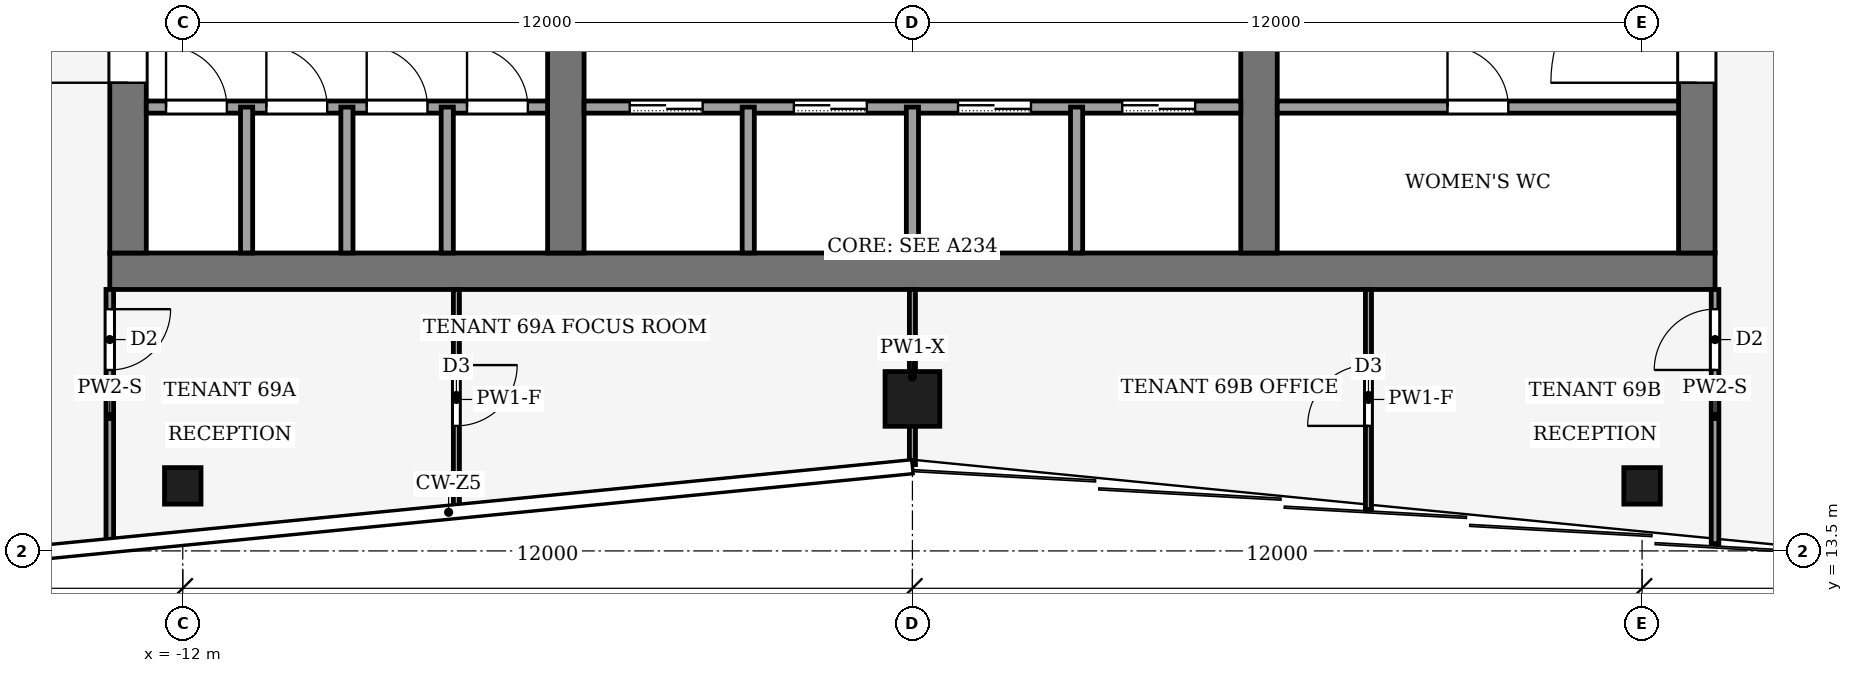
"""IFC4 building model, lengths in metres.
Left out: names, types, materials, properties, quantities, classifications, styles, units other than length and angle.
Written with IfcOpenShell. Run it as: python <this file> out.ifc"""

import sys

from ifc_helpers import new_model, si_unit, direction, frame, frame_2d, origin, origin_2d, place, context, subcontext, project, spatial, rectangle, hollow_rectangle, extrude, element, fill, save


model = new_model("IFC4")
c1 = context("Model", 3, precision=1e-05, world=origin(), true_north=direction((0.0, 1.0)))
c2 = subcontext(c1, "Body", "Model", "MODEL_VIEW")
j1 = project(units=[si_unit("LENGTHUNIT", "METRE"), si_unit("PLANEANGLEUNIT", "RADIAN")], contexts=[c1])
p1 = place(None, origin())
s1 = spatial("IfcSite", under=j1, at=p1, CompositionType="ELEMENT")
p2 = place(p1, origin())
s2 = spatial("IfcBuilding", under=s1, at=p2, CompositionType="ELEMENT")
p3 = place(p2, frame((0.0, 0.0, 302.0)))
s3 = spatial("IfcBuildingStorey", under=s2, at=p3, CompositionType="ELEMENT", Elevation=302.0)
p4 = place(p3, frame((-13.2, 18.1, -0.13), z_axis=(0.0, 0.0, 1.0), x_axis=(1.0, 0.0, 0.0)))
e1 = element("IfcWall", 1, at=p4, inside=s3, PredefinedType="SHEAR", context=c2, shape_type="SweptSolid", body=[
    extrude(rectangle(XDim=26.4, YDim=0.6, at=frame_2d((13.2, 0.0))), origin(), (0.0, 0.0, 1.0), 4.0),
])
p5 = place(p3, frame((-12.9, 18.4, -0.13), z_axis=(0.0, 0.0, 1.0), x_axis=(0.0, 1.0, 0.0)))
e2 = element("IfcWall", 2, at=p5, inside=s3, PredefinedType="SHEAR", context=c2, shape_type="SweptSolid", body=[
    extrude(rectangle(XDim=19.2, YDim=0.6, at=frame_2d((9.6, 0.0))), origin(), (0.0, 0.0, 1.0), 4.0),
])
p6 = place(p5, frame((2.8, 0.0, 0.13)))
e3 = element("IfcOpeningElement", 3, at=p6, cuts=e2, PredefinedType="OPENING", context=c2, shape_type="SweptSolid", body=[
    extrude(rectangle(XDim=2.4, YDim=2.4, at=frame_2d((1.2, 1.2))), frame((0.0, 0.31, 0.0), z_axis=(0.0, -1.0, 0.0), x_axis=(1.0, 0.0, 0.0)), (0.0, 0.0, 1.0), 0.62),
])
p7 = place(p5, frame((13.4, 0.0, 0.13)))
e4 = element("IfcOpeningElement", 4, at=p7, cuts=e2, PredefinedType="OPENING", context=c2, shape_type="SweptSolid", body=[
    extrude(rectangle(XDim=1.4, YDim=2.2, at=frame_2d((0.7, 1.1))), frame((0.0, 0.31, 0.0), z_axis=(0.0, -1.0, 0.0), x_axis=(1.0, 0.0, 0.0)), (0.0, 0.0, 1.0), 0.62),
])
p8 = place(p3, frame((12.9, 18.4, -0.13), z_axis=(0.0, 0.0, 1.0), x_axis=(0.0, 1.0, 0.0)))
e5 = element("IfcWall", 5, at=p8, inside=s3, PredefinedType="SHEAR", context=c2, shape_type="SweptSolid", body=[
    extrude(rectangle(XDim=19.2, YDim=0.6, at=frame_2d((9.6, 0.0))), origin(), (0.0, 0.0, 1.0), 4.0),
])
p9 = place(p8, frame((2.8, 0.0, 0.13)))
e6 = element("IfcOpeningElement", 6, at=p9, cuts=e5, PredefinedType="OPENING", context=c2, shape_type="SweptSolid", body=[
    extrude(rectangle(XDim=2.4, YDim=2.4, at=frame_2d((1.2, 1.2))), frame((0.0, 0.31, 0.0), z_axis=(0.0, -1.0, 0.0), x_axis=(1.0, 0.0, 0.0)), (0.0, 0.0, 1.0), 0.62),
])
p10 = place(p8, frame((13.3, 0.0, 0.13)))
e7 = element("IfcOpeningElement", 7, at=p10, cuts=e5, PredefinedType="OPENING", context=c2, shape_type="SweptSolid", body=[
    extrude(rectangle(XDim=2.4, YDim=2.4, at=frame_2d((1.2, 1.2))), frame((0.0, 0.31, 0.0), z_axis=(0.0, -1.0, 0.0), x_axis=(1.0, 0.0, 0.0)), (0.0, 0.0, 1.0), 0.62),
])
p11 = place(p3, frame((-5.7, 18.4, -0.13), z_axis=(0.0, 0.0, 1.0), x_axis=(0.0, 1.0, 0.0)))
e8 = element("IfcWall", 8, at=p11, inside=s3, PredefinedType="SHEAR", context=c2, shape_type="SweptSolid", body=[
    extrude(rectangle(XDim=19.2, YDim=0.6, at=frame_2d((9.6, 0.0))), origin(), (0.0, 0.0, 1.0), 4.0),
])
p12 = place(p11, frame((8.35, 0.0, 0.13)))
e9 = element("IfcOpeningElement", 9, at=p12, cuts=e8, PredefinedType="OPENING", context=c2, shape_type="SweptSolid", body=[
    extrude(rectangle(XDim=0.9, YDim=2.1, at=frame_2d((0.45, 1.05))), frame((0.0, 0.31, 0.0), z_axis=(0.0, -1.0, 0.0), x_axis=(1.0, 0.0, 0.0)), (0.0, 0.0, 1.0), 0.62),
])
p13 = place(p3, frame((5.7, 18.4, -0.13), z_axis=(0.0, 0.0, 1.0), x_axis=(0.0, 1.0, 0.0)))
e10 = element("IfcWall", 10, at=p13, inside=s3, PredefinedType="SHEAR", context=c2, shape_type="SweptSolid", body=[
    extrude(rectangle(XDim=19.2, YDim=0.6, at=frame_2d((9.6, 0.0))), origin(), (0.0, 0.0, 1.0), 4.0),
])
p14 = place(p13, frame((8.35, 0.0, 0.13)))
e11 = element("IfcOpeningElement", 11, at=p14, cuts=e10, PredefinedType="OPENING", context=c2, shape_type="SweptSolid", body=[
    extrude(rectangle(XDim=0.9, YDim=2.1, at=frame_2d((0.45, 1.05))), frame((0.0, 0.31, 0.0), z_axis=(0.0, -1.0, 0.0), x_axis=(1.0, 0.0, 0.0)), (0.0, 0.0, 1.0), 0.62),
])
p15 = place(p13, frame((13.3, 0.0, 0.13)))
e12 = element("IfcOpeningElement", 12, at=p15, cuts=e10, PredefinedType="OPENING", context=c2, shape_type="SweptSolid", body=[
    extrude(rectangle(XDim=2.4, YDim=2.4, at=frame_2d((1.2, 1.2))), frame((0.0, 0.31, 0.0), z_axis=(0.0, -1.0, 0.0), x_axis=(1.0, 0.0, 0.0)), (0.0, 0.0, 1.0), 0.62),
])
p16 = place(p3, frame((0.0, 16.0, 0.0), z_axis=(0.0, 0.0, 1.0), x_axis=(1.0, 0.0, 0.0)))
e13 = element("IfcColumn", 13, at=p16, inside=s3, PredefinedType="COLUMN", context=c2, shape_type="SweptSolid", body=[
    extrude(hollow_rectangle(XDim=0.9, YDim=0.9, WallThickness=0.04, at=origin_2d()), origin(), (0.0, 0.0, 1.0), 4.0),
])
for number, where, z_axis, x_axis in (
    (14, (-12.0, 14.57, 0.0), (0.0, 0.0, 1.0), (1.0, 0.0, 0.0)),
    (15, (12.0, 14.57, 0.0), (0.0, 0.0, 1.0), (1.0, 0.0, 0.0)),
):
    element("IfcColumn", number, at=place(p3, frame(where, z_axis=z_axis, x_axis=x_axis)), inside=s3, PredefinedType="COLUMN", context=c2, shape_type="SweptSolid", body=[
        extrude(hollow_rectangle(XDim=0.6, YDim=0.6, WallThickness=0.025, at=origin_2d()), origin(), (0.0, 0.0, 1.0), 4.0),
    ])
p17 = place(p3, frame((-12.6, 20.8, 0.0), z_axis=(0.0, 0.0, 1.0), x_axis=(1.0, 0.0, 0.0)))
e16 = element("IfcWall", 16, at=p17, inside=s3, PredefinedType="PARTITIONING", context=c2, shape_type="SweptSolid", body=[
    extrude(rectangle(XDim=6.6, YDim=0.2, at=frame_2d((3.3, 0.0))), origin(), (0.0, 0.0, 1.0), 3.87),
])
p18 = place(p17, frame((0.325, 0.0, 0.0)))
e17 = element("IfcOpeningElement", 17, at=p18, cuts=e16, PredefinedType="OPENING", context=c2, shape_type="SweptSolid", body=[
    extrude(rectangle(XDim=1.0, YDim=2.1, at=frame_2d((0.5, 1.05))), frame((0.0, 0.11, 0.0), z_axis=(0.0, -1.0, 0.0), x_axis=(1.0, 0.0, 0.0)), (0.0, 0.0, 1.0), 0.22),
])
p19 = place(p17, frame((1.975, 0.0, 0.0)))
e18 = element("IfcOpeningElement", 18, at=p19, cuts=e16, PredefinedType="OPENING", context=c2, shape_type="SweptSolid", body=[
    extrude(rectangle(XDim=1.0, YDim=2.1, at=frame_2d((0.5, 1.05))), frame((0.0, 0.11, 0.0), z_axis=(0.0, -1.0, 0.0), x_axis=(1.0, 0.0, 0.0)), (0.0, 0.0, 1.0), 0.22),
])
p20 = place(p17, frame((3.625, 0.0, 0.0)))
e19 = element("IfcOpeningElement", 19, at=p20, cuts=e16, PredefinedType="OPENING", context=c2, shape_type="SweptSolid", body=[
    extrude(rectangle(XDim=1.0, YDim=2.1, at=frame_2d((0.5, 1.05))), frame((0.0, 0.11, 0.0), z_axis=(0.0, -1.0, 0.0), x_axis=(1.0, 0.0, 0.0)), (0.0, 0.0, 1.0), 0.22),
])
p21 = place(p17, frame((5.275, 0.0, 0.0)))
e20 = element("IfcOpeningElement", 20, at=p21, cuts=e16, PredefinedType="OPENING", context=c2, shape_type="SweptSolid", body=[
    extrude(rectangle(XDim=1.0, YDim=2.1, at=frame_2d((0.5, 1.05))), frame((0.0, 0.11, 0.0), z_axis=(0.0, -1.0, 0.0), x_axis=(1.0, 0.0, 0.0)), (0.0, 0.0, 1.0), 0.22),
])
p22 = place(p3, frame((-5.4, 20.8, 0.0), z_axis=(0.0, 0.0, 1.0), x_axis=(1.0, 0.0, 0.0)))
e21 = element("IfcWall", 21, at=p22, inside=s3, PredefinedType="PARTITIONING", context=c2, shape_type="SweptSolid", body=[
    extrude(rectangle(XDim=10.8, YDim=0.2, at=frame_2d((5.4, 0.0))), origin(), (0.0, 0.0, 1.0), 3.87),
])
p23 = place(p22, frame((0.75, 0.0, 0.0)))
e22 = element("IfcOpeningElement", 22, at=p23, cuts=e21, PredefinedType="OPENING", context=c2, shape_type="SweptSolid", body=[
    extrude(rectangle(XDim=1.2, YDim=2.2, at=frame_2d((0.6, 1.1))), frame((0.0, 0.11, 0.0), z_axis=(0.0, -1.0, 0.0), x_axis=(1.0, 0.0, 0.0)), (0.0, 0.0, 1.0), 0.22),
])
p24 = place(p22, frame((3.45, 0.0, 0.0)))
e23 = element("IfcOpeningElement", 23, at=p24, cuts=e21, PredefinedType="OPENING", context=c2, shape_type="SweptSolid", body=[
    extrude(rectangle(XDim=1.2, YDim=2.2, at=frame_2d((0.6, 1.1))), frame((0.0, 0.11, 0.0), z_axis=(0.0, -1.0, 0.0), x_axis=(1.0, 0.0, 0.0)), (0.0, 0.0, 1.0), 0.22),
])
p25 = place(p22, frame((6.15, 0.0, 0.0)))
e24 = element("IfcOpeningElement", 24, at=p25, cuts=e21, PredefinedType="OPENING", context=c2, shape_type="SweptSolid", body=[
    extrude(rectangle(XDim=1.2, YDim=2.2, at=frame_2d((0.6, 1.1))), frame((0.0, 0.11, 0.0), z_axis=(0.0, -1.0, 0.0), x_axis=(1.0, 0.0, 0.0)), (0.0, 0.0, 1.0), 0.22),
])
p26 = place(p22, frame((8.85, 0.0, 0.0)))
e25 = element("IfcOpeningElement", 25, at=p26, cuts=e21, PredefinedType="OPENING", context=c2, shape_type="SweptSolid", body=[
    extrude(rectangle(XDim=1.2, YDim=2.2, at=frame_2d((0.6, 1.1))), frame((0.0, 0.11, 0.0), z_axis=(0.0, -1.0, 0.0), x_axis=(1.0, 0.0, 0.0)), (0.0, 0.0, 1.0), 0.22),
])
p27 = place(p3, frame((6.0, 20.8, 0.0), z_axis=(0.0, 0.0, 1.0), x_axis=(1.0, 0.0, 0.0)))
e26 = element("IfcWall", 26, at=p27, inside=s3, PredefinedType="PARTITIONING", context=c2, shape_type="SweptSolid", body=[
    extrude(rectangle(XDim=6.6, YDim=0.2, at=frame_2d((3.3, 0.0))), origin(), (0.0, 0.0, 1.0), 3.87),
])
p28 = place(p27, frame((2.8, 0.0, 0.0)))
e27 = element("IfcOpeningElement", 27, at=p28, cuts=e26, PredefinedType="OPENING", context=c2, shape_type="SweptSolid", body=[
    extrude(rectangle(XDim=1.0, YDim=2.1, at=frame_2d((0.5, 1.05))), frame((0.0, 0.11, 0.0), z_axis=(0.0, -1.0, 0.0), x_axis=(1.0, 0.0, 0.0)), (0.0, 0.0, 1.0), 0.22),
])
for number, where, z_axis, x_axis in (
    (28, (-10.95, 18.4, 0.0), (0.0, 0.0, 1.0), (0.0, 1.0, 0.0)),
    (29, (-9.3, 18.4, 0.0), (0.0, 0.0, 1.0), (0.0, 1.0, 0.0)),
    (30, (-7.65, 18.4, 0.0), (0.0, 0.0, 1.0), (0.0, 1.0, 0.0)),
    (31, (-2.7, 18.4, 0.0), (0.0, 0.0, 1.0), (0.0, 1.0, 0.0)),
    (32, (0.0, 18.4, 0.0), (0.0, 0.0, 1.0), (0.0, 1.0, 0.0)),
    (33, (2.7, 18.4, 0.0), (0.0, 0.0, 1.0), (0.0, 1.0, 0.0)),
):
    element("IfcWall", number, at=place(p3, frame(where, z_axis=z_axis, x_axis=x_axis)), inside=s3, PredefinedType="PARTITIONING", context=c2, shape_type="SweptSolid", body=[
        extrude(rectangle(XDim=2.4, YDim=0.2, at=frame_2d((1.2, 0.0))), origin(), (0.0, 0.0, 1.0), 3.87),
    ])
p29 = place(p3, frame((-13.2, 17.8, 0.0), z_axis=(0.0, 0.0, 1.0), x_axis=(0.0, -1.0, 0.0)))
e34 = element("IfcWall", 34, at=p29, inside=s3, PredefinedType="PARTITIONING", context=c2, shape_type="SweptSolid", body=[
    extrude(rectangle(XDim=4.178, YDim=0.125, at=frame_2d((2.089, 0.0))), origin(), (0.0, 0.0, 1.0), 3.04),
])
p30 = place(p29, frame((0.324, 0.0, 0.0)))
e35 = element("IfcOpeningElement", 35, at=p30, cuts=e34, PredefinedType="OPENING", context=c2, shape_type="SweptSolid", body=[
    extrude(rectangle(XDim=1.0, YDim=2.1, at=frame_2d((0.5, 1.05))), frame((0.0, 0.073, 0.0), z_axis=(0.0, -1.0, 0.0), x_axis=(1.0, 0.0, 0.0)), (0.0, 0.0, 1.0), 0.145),
])
p31 = place(p3, frame((13.2, 13.622, 0.0), z_axis=(0.0, 0.0, 1.0), x_axis=(0.0, 1.0, 0.0)))
e36 = element("IfcWall", 36, at=p31, inside=s3, PredefinedType="PARTITIONING", context=c2, shape_type="SweptSolid", body=[
    extrude(rectangle(XDim=4.178, YDim=0.125, at=frame_2d((2.089, 0.0))), origin(), (0.0, 0.0, 1.0), 3.04),
])
p32 = place(p31, frame((2.854, 0.0, 0.0)))
e37 = element("IfcOpeningElement", 37, at=p32, cuts=e36, PredefinedType="OPENING", context=c2, shape_type="SweptSolid", body=[
    extrude(rectangle(XDim=1.0, YDim=2.1, at=frame_2d((0.5, 1.05))), frame((0.0, 0.073, 0.0), z_axis=(0.0, -1.0, 0.0), x_axis=(1.0, 0.0, 0.0)), (0.0, 0.0, 1.0), 0.145),
])
p33 = place(p3, frame((-7.5, 17.8, 0.0), z_axis=(0.0, 0.0, 1.0), x_axis=(0.0, -1.0, 0.0)))
e38 = element("IfcWall", 38, at=p33, inside=s3, PredefinedType="PARTITIONING", context=c2, shape_type="SweptSolid", body=[
    extrude(rectangle(XDim=3.618, YDim=0.1, at=frame_2d((1.809, 0.0))), origin(), (0.0, 0.0, 1.0), 3.04),
])
p34 = place(p33, frame((1.244, 0.0, 0.0)))
e39 = element("IfcOpeningElement", 39, at=p34, cuts=e38, PredefinedType="OPENING", context=c2, shape_type="SweptSolid", body=[
    extrude(rectangle(XDim=1.0, YDim=2.1, at=frame_2d((0.5, 1.05))), frame((0.0, 0.06, 0.0), z_axis=(0.0, -1.0, 0.0), x_axis=(1.0, 0.0, 0.0)), (0.0, 0.0, 1.0), 0.12),
])
p35 = place(p3, frame((0.0, 14.92, 0.0), z_axis=(0.0, 0.0, 1.0), x_axis=(0.0, 1.0, 0.0)))
e40 = element("IfcWall", 40, at=p35, inside=s3, PredefinedType="PARTITIONING", context=c2, shape_type="SweptSolid", body=[
    extrude(rectangle(XDim=2.88, YDim=0.1, at=frame_2d((1.44, 0.0))), origin(), (0.0, 0.0, 1.0), 3.54),
])
p36 = place(p3, frame((7.5, 14.182, 0.0), z_axis=(0.0, 0.0, 1.0), x_axis=(0.0, 1.0, 0.0)))
e41 = element("IfcWall", 41, at=p36, inside=s3, PredefinedType="PARTITIONING", context=c2, shape_type="SweptSolid", body=[
    extrude(rectangle(XDim=3.618, YDim=0.1, at=frame_2d((1.809, 0.0))), origin(), (0.0, 0.0, 1.0), 3.04),
])
p37 = place(p36, frame((1.374, 0.0, 0.0)))
e42 = element("IfcOpeningElement", 42, at=p37, cuts=e41, PredefinedType="OPENING", context=c2, shape_type="SweptSolid", body=[
    extrude(rectangle(XDim=1.0, YDim=2.1, at=frame_2d((0.5, 1.05))), frame((0.0, 0.06, 0.0), z_axis=(0.0, -1.0, 0.0), x_axis=(1.0, 0.0, 0.0)), (0.0, 0.0, 1.0), 0.12),
])
p38 = place(p23, origin())
e43 = element("IfcDoor", 43, at=p38, inside=s3, OperationType="SLIDING_TO_LEFT", PredefinedType="DOOR", context=c2, shape_type="SweptSolid", body=[
    extrude(rectangle(XDim=1.2, YDim=2.2, at=frame_2d((0.6, 1.1))), frame((0.0, 0.025, 0.0), z_axis=(0.0, -1.0, 0.0), x_axis=(1.0, 0.0, 0.0)), (0.0, 0.0, 1.0), 0.05),
])
fill(e22, e43)
p39 = place(p24, origin())
e44 = element("IfcDoor", 44, at=p39, inside=s3, OperationType="SLIDING_TO_LEFT", PredefinedType="DOOR", context=c2, shape_type="SweptSolid", body=[
    extrude(rectangle(XDim=1.2, YDim=2.2, at=frame_2d((0.6, 1.1))), frame((0.0, 0.025, 0.0), z_axis=(0.0, -1.0, 0.0), x_axis=(1.0, 0.0, 0.0)), (0.0, 0.0, 1.0), 0.05),
])
fill(e23, e44)
p40 = place(p25, origin())
e45 = element("IfcDoor", 45, at=p40, inside=s3, OperationType="SLIDING_TO_LEFT", PredefinedType="DOOR", context=c2, shape_type="SweptSolid", body=[
    extrude(rectangle(XDim=1.2, YDim=2.2, at=frame_2d((0.6, 1.1))), frame((0.0, 0.025, 0.0), z_axis=(0.0, -1.0, 0.0), x_axis=(1.0, 0.0, 0.0)), (0.0, 0.0, 1.0), 0.05),
])
fill(e24, e45)
p41 = place(p26, origin())
e46 = element("IfcDoor", 46, at=p41, inside=s3, OperationType="SLIDING_TO_LEFT", PredefinedType="DOOR", context=c2, shape_type="SweptSolid", body=[
    extrude(rectangle(XDim=1.2, YDim=2.2, at=frame_2d((0.6, 1.1))), frame((0.0, 0.025, 0.0), z_axis=(0.0, -1.0, 0.0), x_axis=(1.0, 0.0, 0.0)), (0.0, 0.0, 1.0), 0.05),
])
fill(e25, e46)
p42 = place(p18, origin())
e47 = element("IfcDoor", 47, at=p42, inside=s3, OperationType="SINGLE_SWING_RIGHT", PredefinedType="DOOR", context=c2, shape_type="SweptSolid", body=[
    extrude(rectangle(XDim=1.0, YDim=2.1, at=frame_2d((0.5, 1.05))), frame((0.0, 0.025, 0.0), z_axis=(0.0, -1.0, 0.0), x_axis=(1.0, 0.0, 0.0)), (0.0, 0.0, 1.0), 0.05),
])
fill(e17, e47)
p43 = place(p19, origin())
e48 = element("IfcDoor", 48, at=p43, inside=s3, OperationType="SINGLE_SWING_RIGHT", PredefinedType="DOOR", context=c2, shape_type="SweptSolid", body=[
    extrude(rectangle(XDim=1.0, YDim=2.1, at=frame_2d((0.5, 1.05))), frame((0.0, 0.025, 0.0), z_axis=(0.0, -1.0, 0.0), x_axis=(1.0, 0.0, 0.0)), (0.0, 0.0, 1.0), 0.05),
])
fill(e18, e48)
p44 = place(p20, origin())
e49 = element("IfcDoor", 49, at=p44, inside=s3, OperationType="SINGLE_SWING_LEFT", PredefinedType="DOOR", context=c2, shape_type="SweptSolid", body=[
    extrude(rectangle(XDim=1.0, YDim=2.1, at=frame_2d((0.5, 1.05))), frame((0.0, 0.025, 0.0), z_axis=(0.0, -1.0, 0.0), x_axis=(1.0, 0.0, 0.0)), (0.0, 0.0, 1.0), 0.05),
])
fill(e19, e49)
p45 = place(p21, origin())
e50 = element("IfcDoor", 50, at=p45, inside=s3, OperationType="SINGLE_SWING_LEFT", PredefinedType="DOOR", context=c2, shape_type="SweptSolid", body=[
    extrude(rectangle(XDim=1.0, YDim=2.1, at=frame_2d((0.5, 1.05))), frame((0.0, 0.025, 0.0), z_axis=(0.0, -1.0, 0.0), x_axis=(1.0, 0.0, 0.0)), (0.0, 0.0, 1.0), 0.05),
])
fill(e20, e50)
p46 = place(p28, origin())
e51 = element("IfcDoor", 51, at=p46, inside=s3, OperationType="SINGLE_SWING_LEFT", PredefinedType="DOOR", context=c2, shape_type="SweptSolid", body=[
    extrude(rectangle(XDim=1.0, YDim=2.1, at=frame_2d((0.5, 1.05))), frame((0.0, 0.025, 0.0), z_axis=(0.0, -1.0, 0.0), x_axis=(1.0, 0.0, 0.0)), (0.0, 0.0, 1.0), 0.05),
])
fill(e27, e51)
p47 = place(p6, origin())
e52 = element("IfcDoor", 52, at=p47, inside=s3, OperationType="DOUBLE_DOOR_SINGLE_SWING", PredefinedType="DOOR", context=c2, shape_type="SweptSolid", body=[
    extrude(rectangle(XDim=2.4, YDim=2.4, at=frame_2d((1.2, 1.2))), frame((0.0, 0.025, 0.0), z_axis=(0.0, -1.0, 0.0), x_axis=(1.0, 0.0, 0.0)), (0.0, 0.0, 1.0), 0.05),
])
fill(e3, e52)
p48 = place(p9, origin())
e53 = element("IfcDoor", 53, at=p48, inside=s3, OperationType="DOUBLE_DOOR_SINGLE_SWING", PredefinedType="DOOR", context=c2, shape_type="SweptSolid", body=[
    extrude(rectangle(XDim=2.4, YDim=2.4, at=frame_2d((1.2, 1.2))), frame((0.0, 0.025, 0.0), z_axis=(0.0, -1.0, 0.0), x_axis=(1.0, 0.0, 0.0)), (0.0, 0.0, 1.0), 0.05),
])
fill(e6, e53)
p49 = place(p30, origin())
e54 = element("IfcDoor", 54, at=p49, inside=s3, OperationType="SINGLE_SWING_LEFT", PredefinedType="DOOR", context=c2, shape_type="SweptSolid", body=[
    extrude(rectangle(XDim=1.0, YDim=2.1, at=frame_2d((0.5, 1.05))), frame((0.0, 0.025, 0.0), z_axis=(0.0, -1.0, 0.0), x_axis=(1.0, 0.0, 0.0)), (0.0, 0.0, 1.0), 0.05),
])
fill(e35, e54)
p50 = place(p32, origin())
e55 = element("IfcDoor", 55, at=p50, inside=s3, OperationType="SINGLE_SWING_RIGHT", PredefinedType="DOOR", context=c2, shape_type="SweptSolid", body=[
    extrude(rectangle(XDim=1.0, YDim=2.1, at=frame_2d((0.5, 1.05))), frame((0.0, 0.025, 0.0), z_axis=(0.0, -1.0, 0.0), x_axis=(1.0, 0.0, 0.0)), (0.0, 0.0, 1.0), 0.05),
])
fill(e37, e55)
p51 = place(p34, origin())
e56 = element("IfcDoor", 56, at=p51, inside=s3, OperationType="SINGLE_SWING_LEFT", PredefinedType="DOOR", context=c2, shape_type="SweptSolid", body=[
    extrude(rectangle(XDim=1.0, YDim=2.1, at=frame_2d((0.5, 1.05))), frame((0.0, 0.025, 0.0), z_axis=(0.0, -1.0, 0.0), x_axis=(1.0, 0.0, 0.0)), (0.0, 0.0, 1.0), 0.05),
])
fill(e39, e56)
p52 = place(p37, origin())
e57 = element("IfcDoor", 57, at=p52, inside=s3, OperationType="SINGLE_SWING_RIGHT", PredefinedType="DOOR", context=c2, shape_type="SweptSolid", body=[
    extrude(rectangle(XDim=1.0, YDim=2.1, at=frame_2d((0.5, 1.05))), frame((0.0, 0.025, 0.0), z_axis=(0.0, -1.0, 0.0), x_axis=(1.0, 0.0, 0.0)), (0.0, 0.0, 1.0), 0.05),
])
fill(e42, e57)
save(model, sys.argv[1])
